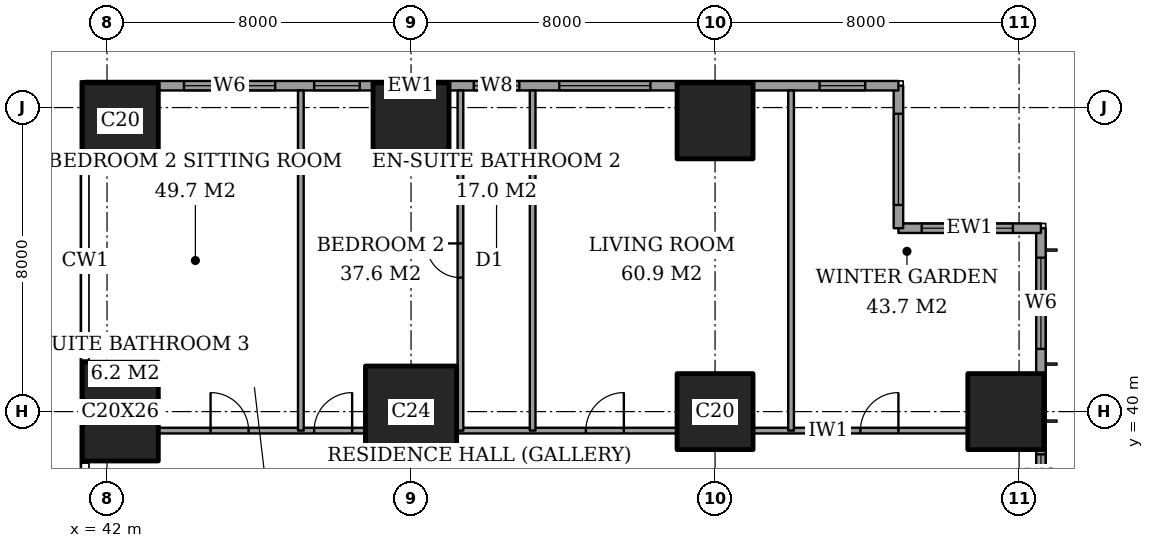
"""IFC4 building model, lengths in metres.
Left out: names, types, materials, properties, quantities, classifications, styles, units other than length and angle.
Written with IfcOpenShell. Run it as: python <this file> out.ifc"""

import sys

from ifc_helpers import new_model, si_unit, direction, frame, frame_2d, origin, origin_2d, place, context, subcontext, project, spatial, rectangle, extrude, element, fill, save


model = new_model("IFC4")
c1 = context("Model", 3, precision=1e-05, world=origin(), true_north=direction((0.0, 1.0)))
c2 = subcontext(c1, "Body", "Model", "MODEL_VIEW")
j1 = project(units=[si_unit("LENGTHUNIT", "METRE"), si_unit("PLANEANGLEUNIT", "RADIAN")], contexts=[c1])
p1 = place(None, origin())
s1 = spatial("IfcSite", under=j1, at=p1, CompositionType="ELEMENT")
p2 = place(p1, origin())
s2 = spatial("IfcBuilding", under=s1, at=p2, CompositionType="ELEMENT")
p3 = place(p2, frame((0.0, 0.0, 29.6)))
s3 = spatial("IfcBuildingStorey", under=s2, at=p3, CompositionType="ELEMENT", Elevation=29.6)
p4 = place(p3, frame((42.35, 40.0, 0.0), z_axis=(0.0, 0.0, 1.0), x_axis=(1.0, 0.0, 0.0)))
e1 = element("IfcColumn", 1, at=p4, inside=s3, PredefinedType="COLUMN", context=c2, shape_type="SweptSolid", body=[
    extrude(rectangle(XDim=2.0, YDim=2.6, at=origin_2d()), origin(), (0.0, 0.0, 1.0), 3.6),
])
p5 = place(p3, frame((42.35, 47.65, 0.0), z_axis=(0.0, 0.0, 1.0), x_axis=(1.0, 0.0, 0.0)))
e2 = element("IfcColumn", 2, at=p5, inside=s3, PredefinedType="COLUMN", context=c2, shape_type="SweptSolid", body=[
    extrude(rectangle(XDim=2.0, YDim=2.0, at=origin_2d()), origin(), (0.0, 0.0, 1.0), 3.6),
])
p6 = place(p3, frame((50.0, 40.0, 0.0), z_axis=(0.0, 0.0, 1.0), x_axis=(1.0, 0.0, 0.0)))
e3 = element("IfcColumn", 3, at=p6, inside=s3, PredefinedType="COLUMN", context=c2, shape_type="SweptSolid", body=[
    extrude(rectangle(XDim=2.4, YDim=2.4, at=origin_2d()), origin(), (0.0, 0.0, 1.0), 3.6),
])
for number, where, z_axis, x_axis in (
    (4, (50.0, 47.65, 0.0), (0.0, 0.0, 1.0), (1.0, 0.0, 0.0)),
    (5, (58.0, 40.0, 0.0), (0.0, 0.0, 1.0), (1.0, 0.0, 0.0)),
    (6, (58.0, 47.65, 0.0), (0.0, 0.0, 1.0), (1.0, 0.0, 0.0)),
    (7, (65.65, 40.0, 0.0), (0.0, 0.0, 1.0), (1.0, 0.0, 0.0)),
):
    element("IfcColumn", number, at=place(p3, frame(where, z_axis=z_axis, x_axis=x_axis)), inside=s3, PredefinedType="COLUMN", context=c2, shape_type="SweptSolid", body=[
        extrude(rectangle(XDim=2.0, YDim=2.0, at=origin_2d()), origin(), (0.0, 0.0, 1.0), 3.6),
    ])
p7 = place(p3, frame((66.575, 3.175, 0.0), z_axis=(0.0, 0.0, 1.0), x_axis=(0.0, 1.0, 0.0)))
e8 = element("IfcWall", 8, at=p7, inside=s3, PredefinedType="SOLIDWALL", context=c2, shape_type="SweptSolid", body=[
    extrude(rectangle(XDim=41.65, YDim=0.25, at=frame_2d((20.825, 0.0))), origin(), (0.0, 0.0, 1.0), 3.6),
])
p8 = place(p7, frame((0.775, 0.0, 0.6)))
e9 = element("IfcOpeningElement", 9, at=p8, cuts=e8, PredefinedType="OPENING", context=c2, shape_type="SweptSolid", body=[
    extrude(rectangle(XDim=2.4, YDim=2.0, at=frame_2d((1.2, 1.0))), frame((0.0, 0.135, 0.0), z_axis=(0.0, -1.0, 0.0), x_axis=(1.0, 0.0, 0.0)), (0.0, 0.0, 1.0), 0.27),
])
p9 = place(p7, frame((6.1, 0.0, 0.6)))
e10 = element("IfcOpeningElement", 10, at=p9, cuts=e8, PredefinedType="OPENING", context=c2, shape_type="SweptSolid", body=[
    extrude(rectangle(XDim=1.2, YDim=2.0, at=frame_2d((0.6, 1.0))), frame((0.0, 0.135, 0.0), z_axis=(0.0, -1.0, 0.0), x_axis=(1.0, 0.0, 0.0)), (0.0, 0.0, 1.0), 0.27),
])
p10 = place(p7, frame((8.275, 0.0, 0.6)))
e11 = element("IfcOpeningElement", 11, at=p10, cuts=e8, PredefinedType="OPENING", context=c2, shape_type="SweptSolid", body=[
    extrude(rectangle(XDim=2.4, YDim=2.0, at=frame_2d((1.2, 1.0))), frame((0.0, 0.135, 0.0), z_axis=(0.0, -1.0, 0.0), x_axis=(1.0, 0.0, 0.0)), (0.0, 0.0, 1.0), 0.27),
])
p11 = place(p7, frame((15.775, 0.0, 0.6)))
e12 = element("IfcOpeningElement", 12, at=p11, cuts=e8, PredefinedType="OPENING", context=c2, shape_type="SweptSolid", body=[
    extrude(rectangle(XDim=2.4, YDim=2.0, at=frame_2d((1.2, 1.0))), frame((0.0, 0.135, 0.0), z_axis=(0.0, -1.0, 0.0), x_axis=(1.0, 0.0, 0.0)), (0.0, 0.0, 1.0), 0.27),
])
p12 = place(p7, frame((23.475, 0.0, 0.6)))
e13 = element("IfcOpeningElement", 13, at=p12, cuts=e8, PredefinedType="OPENING", context=c2, shape_type="SweptSolid", body=[
    extrude(rectangle(XDim=2.4, YDim=2.0, at=frame_2d((1.2, 1.0))), frame((0.0, 0.135, 0.0), z_axis=(0.0, -1.0, 0.0), x_axis=(1.0, 0.0, 0.0)), (0.0, 0.0, 1.0), 0.27),
])
p13 = place(p7, frame((30.975, 0.0, 0.6)))
e14 = element("IfcOpeningElement", 14, at=p13, cuts=e8, PredefinedType="OPENING", context=c2, shape_type="SweptSolid", body=[
    extrude(rectangle(XDim=2.4, YDim=2.0, at=frame_2d((1.2, 1.0))), frame((0.0, 0.135, 0.0), z_axis=(0.0, -1.0, 0.0), x_axis=(1.0, 0.0, 0.0)), (0.0, 0.0, 1.0), 0.27),
])
p14 = place(p7, frame((34.5, 0.0, 0.6)))
e15 = element("IfcOpeningElement", 15, at=p14, cuts=e8, PredefinedType="OPENING", context=c2, shape_type="SweptSolid", body=[
    extrude(rectangle(XDim=1.2, YDim=2.0, at=frame_2d((0.6, 1.0))), frame((0.0, 0.135, 0.0), z_axis=(0.0, -1.0, 0.0), x_axis=(1.0, 0.0, 0.0)), (0.0, 0.0, 1.0), 0.27),
])
p15 = place(p7, frame((38.475, 0.0, 0.6)))
e16 = element("IfcOpeningElement", 16, at=p15, cuts=e8, PredefinedType="OPENING", context=c2, shape_type="SweptSolid", body=[
    extrude(rectangle(XDim=2.4, YDim=2.0, at=frame_2d((1.2, 1.0))), frame((0.0, 0.135, 0.0), z_axis=(0.0, -1.0, 0.0), x_axis=(1.0, 0.0, 0.0)), (0.0, 0.0, 1.0), 0.27),
])
p16 = place(p3, frame((66.575, 44.825, 0.0), z_axis=(0.0, 0.0, 1.0), x_axis=(-1.0, 0.0, 0.0)))
e17 = element("IfcWall", 17, at=p16, inside=s3, PredefinedType="SOLIDWALL", context=c2, shape_type="SweptSolid", body=[
    extrude(rectangle(XDim=3.75, YDim=0.25, at=frame_2d((1.875, 0.0))), origin(), (0.0, 0.0, 1.0), 3.6),
])
p17 = place(p16, frame((0.738, 0.0, 0.6)))
e18 = element("IfcOpeningElement", 18, at=p17, cuts=e17, PredefinedType="OPENING", context=c2, shape_type="SweptSolid", body=[
    extrude(rectangle(XDim=2.4, YDim=2.0, at=frame_2d((1.2, 1.0))), frame((0.0, 0.135, 0.0), z_axis=(0.0, -1.0, 0.0), x_axis=(1.0, 0.0, 0.0)), (0.0, 0.0, 1.0), 0.27),
])
p18 = place(p3, frame((62.825, 44.825, 0.0), z_axis=(0.0, 0.0, 1.0), x_axis=(0.0, 1.0, 0.0)))
e19 = element("IfcWall", 19, at=p18, inside=s3, PredefinedType="SOLIDWALL", context=c2, shape_type="SweptSolid", body=[
    extrude(rectangle(XDim=3.75, YDim=0.25, at=frame_2d((1.875, 0.0))), origin(), (0.0, 0.0, 1.0), 3.6),
])
p19 = place(p18, frame((0.613, 0.0, 0.6)))
e20 = element("IfcOpeningElement", 20, at=p19, cuts=e19, PredefinedType="OPENING", context=c2, shape_type="SweptSolid", body=[
    extrude(rectangle(XDim=2.4, YDim=2.0, at=frame_2d((1.2, 1.0))), frame((0.0, 0.135, 0.0), z_axis=(0.0, -1.0, 0.0), x_axis=(1.0, 0.0, 0.0)), (0.0, 0.0, 1.0), 0.27),
])
p20 = place(p3, frame((62.825, 48.575, 0.0), z_axis=(0.0, 0.0, 1.0), x_axis=(-1.0, 0.0, 0.0)))
e21 = element("IfcWall", 21, at=p20, inside=s3, PredefinedType="SOLIDWALL", context=c2, shape_type="SweptSolid", body=[
    extrude(rectangle(XDim=21.4, YDim=0.25, at=frame_2d((10.7, 0.0))), origin(), (0.0, 0.0, 1.0), 3.6),
])
p21 = place(p20, frame((0.875, 0.0, 0.6)))
e22 = element("IfcOpeningElement", 22, at=p21, cuts=e21, PredefinedType="OPENING", context=c2, shape_type="SweptSolid", body=[
    extrude(rectangle(XDim=1.2, YDim=2.0, at=frame_2d((0.6, 1.0))), frame((0.0, 0.135, 0.0), z_axis=(0.0, -1.0, 0.0), x_axis=(1.0, 0.0, 0.0)), (0.0, 0.0, 1.0), 0.27),
])
p22 = place(p20, frame((6.525, 0.0, 0.6)))
e23 = element("IfcOpeningElement", 23, at=p22, cuts=e21, PredefinedType="OPENING", context=c2, shape_type="SweptSolid", body=[
    extrude(rectangle(XDim=2.4, YDim=2.0, at=frame_2d((1.2, 1.0))), frame((0.0, 0.135, 0.0), z_axis=(0.0, -1.0, 0.0), x_axis=(1.0, 0.0, 0.0)), (0.0, 0.0, 1.0), 0.27),
])
p23 = place(p20, frame((9.975, 0.0, 0.6)))
e24 = element("IfcOpeningElement", 24, at=p23, cuts=e21, PredefinedType="OPENING", context=c2, shape_type="SweptSolid", body=[
    extrude(rectangle(XDim=1.2, YDim=2.0, at=frame_2d((0.6, 1.0))), frame((0.0, 0.135, 0.0), z_axis=(0.0, -1.0, 0.0), x_axis=(1.0, 0.0, 0.0)), (0.0, 0.0, 1.0), 0.27),
])
p24 = place(p20, frame((14.175, 0.0, 0.6)))
e25 = element("IfcOpeningElement", 25, at=p24, cuts=e21, PredefinedType="OPENING", context=c2, shape_type="SweptSolid", body=[
    extrude(rectangle(XDim=1.2, YDim=2.0, at=frame_2d((0.6, 1.0))), frame((0.0, 0.135, 0.0), z_axis=(0.0, -1.0, 0.0), x_axis=(1.0, 0.0, 0.0)), (0.0, 0.0, 1.0), 0.27),
])
p25 = place(p20, frame((16.4, 0.0, 0.6)))
e26 = element("IfcOpeningElement", 26, at=p25, cuts=e21, PredefinedType="OPENING", context=c2, shape_type="SweptSolid", body=[
    extrude(rectangle(XDim=2.4, YDim=2.0, at=frame_2d((1.2, 1.0))), frame((0.0, 0.135, 0.0), z_axis=(0.0, -1.0, 0.0), x_axis=(1.0, 0.0, 0.0)), (0.0, 0.0, 1.0), 0.27),
])
p26 = place(p3, frame((43.35, 39.5, 0.0), z_axis=(0.0, 0.0, 1.0), x_axis=(1.0, 0.0, 0.0)))
e27 = element("IfcWall", 27, at=p26, inside=s3, PredefinedType="PARTITIONING", context=c2, shape_type="SweptSolid", body=[
    extrude(rectangle(XDim=5.45, YDim=0.15, at=frame_2d((2.725, 0.0))), origin(), (0.0, 0.0, 1.0), 3.35),
])
p27 = place(p26, frame((4.1, 0.0, 0.0)))
e28 = element("IfcOpeningElement", 28, at=p27, cuts=e27, PredefinedType="OPENING", context=c2, shape_type="SweptSolid", body=[
    extrude(rectangle(XDim=1.0, YDim=2.1, at=frame_2d((0.5, 1.05))), frame((0.0, 0.085, 0.0), z_axis=(0.0, -1.0, 0.0), x_axis=(1.0, 0.0, 0.0)), (0.0, 0.0, 1.0), 0.17),
])
p28 = place(p26, frame((1.375, 0.0, 0.0)))
e29 = element("IfcOpeningElement", 29, at=p28, cuts=e27, PredefinedType="OPENING", context=c2, shape_type="SweptSolid", body=[
    extrude(rectangle(XDim=1.0, YDim=2.1, at=frame_2d((0.5, 1.05))), frame((0.0, 0.085, 0.0), z_axis=(0.0, -1.0, 0.0), x_axis=(1.0, 0.0, 0.0)), (0.0, 0.0, 1.0), 0.17),
])
p29 = place(p3, frame((51.2, 39.5, 0.0), z_axis=(0.0, 0.0, 1.0), x_axis=(1.0, 0.0, 0.0)))
e30 = element("IfcWall", 30, at=p29, inside=s3, PredefinedType="PARTITIONING", context=c2, shape_type="SweptSolid", body=[
    extrude(rectangle(XDim=5.8, YDim=0.15, at=frame_2d((2.9, 0.0))), origin(), (0.0, 0.0, 1.0), 3.35),
])
p30 = place(p29, frame((3.4, 0.0, 0.0)))
e31 = element("IfcOpeningElement", 31, at=p30, cuts=e30, PredefinedType="OPENING", context=c2, shape_type="SweptSolid", body=[
    extrude(rectangle(XDim=1.0, YDim=2.1, at=frame_2d((0.5, 1.05))), frame((0.0, 0.085, 0.0), z_axis=(0.0, -1.0, 0.0), x_axis=(1.0, 0.0, 0.0)), (0.0, 0.0, 1.0), 0.17),
])
p31 = place(p3, frame((59.0, 39.5, 0.0), z_axis=(0.0, 0.0, 1.0), x_axis=(1.0, 0.0, 0.0)))
e32 = element("IfcWall", 32, at=p31, inside=s3, PredefinedType="PARTITIONING", context=c2, shape_type="SweptSolid", body=[
    extrude(rectangle(XDim=5.65, YDim=0.15, at=frame_2d((2.825, 0.0))), origin(), (0.0, 0.0, 1.0), 3.35),
])
p32 = place(p31, frame((2.825, 0.0, 0.0)))
e33 = element("IfcOpeningElement", 33, at=p32, cuts=e32, PredefinedType="OPENING", context=c2, shape_type="SweptSolid", body=[
    extrude(rectangle(XDim=1.0, YDim=2.1, at=frame_2d((0.5, 1.05))), frame((0.0, 0.085, 0.0), z_axis=(0.0, -1.0, 0.0), x_axis=(1.0, 0.0, 0.0)), (0.0, 0.0, 1.0), 0.17),
])
p33 = place(p3, frame((47.1, 39.5, 0.0), z_axis=(0.0, 0.0, 1.0), x_axis=(0.0, 1.0, 0.0)))
e34 = element("IfcWall", 34, at=p33, inside=s3, PredefinedType="PARTITIONING", context=c2, shape_type="SweptSolid", body=[
    extrude(rectangle(XDim=8.95, YDim=0.15, at=frame_2d((4.475, 0.0))), origin(), (0.0, 0.0, 1.0), 3.35),
])
p34 = place(p3, frame((51.3, 39.5, 0.0), z_axis=(0.0, 0.0, 1.0), x_axis=(0.0, 1.0, 0.0)))
e35 = element("IfcWall", 35, at=p34, inside=s3, PredefinedType="PARTITIONING", context=c2, shape_type="SweptSolid", body=[
    extrude(rectangle(XDim=8.95, YDim=0.15, at=frame_2d((4.475, 0.0))), origin(), (0.0, 0.0, 1.0), 3.35),
])
p35 = place(p34, frame((4.025, 0.0, 0.0)))
e36 = element("IfcOpeningElement", 36, at=p35, cuts=e35, PredefinedType="OPENING", context=c2, shape_type="SweptSolid", body=[
    extrude(rectangle(XDim=0.9, YDim=2.1, at=frame_2d((0.45, 1.05))), frame((0.0, 0.085, 0.0), z_axis=(0.0, -1.0, 0.0), x_axis=(1.0, 0.0, 0.0)), (0.0, 0.0, 1.0), 0.17),
])
for number, where, z_axis, x_axis in (
    (37, (53.2, 39.5, 0.0), (0.0, 0.0, 1.0), (0.0, 1.0, 0.0)),
    (38, (60.0, 39.5, 0.0), (0.0, 0.0, 1.0), (0.0, 1.0, 0.0)),
):
    element("IfcWall", number, at=place(p3, frame(where, z_axis=z_axis, x_axis=x_axis)), inside=s3, PredefinedType="PARTITIONING", context=c2, shape_type="SweptSolid", body=[
        extrude(rectangle(XDim=8.95, YDim=0.15, at=frame_2d((4.475, 0.0))), origin(), (0.0, 0.0, 1.0), 3.35),
    ])
p36 = place(p14, origin())
e39 = element("IfcWindow", 39, at=p36, inside=s3, PartitioningType="SINGLE_PANEL", PredefinedType="WINDOW", context=c2, shape_type="SweptSolid", body=[
    extrude(rectangle(XDim=1.2, YDim=2.0, at=frame_2d((0.6, 1.0))), frame((0.0, 0.03, 0.0), z_axis=(0.0, -1.0, 0.0), x_axis=(1.0, 0.0, 0.0)), (0.0, 0.0, 1.0), 0.06),
])
fill(e15, e39)
p37 = place(p15, origin())
e40 = element("IfcWindow", 40, at=p37, inside=s3, PartitioningType="SINGLE_PANEL", PredefinedType="WINDOW", context=c2, shape_type="SweptSolid", body=[
    extrude(rectangle(XDim=2.4, YDim=2.0, at=frame_2d((1.2, 1.0))), frame((0.0, 0.03, 0.0), z_axis=(0.0, -1.0, 0.0), x_axis=(1.0, 0.0, 0.0)), (0.0, 0.0, 1.0), 0.06),
])
fill(e16, e40)
p38 = place(p17, origin())
e41 = element("IfcWindow", 41, at=p38, inside=s3, PartitioningType="SINGLE_PANEL", PredefinedType="WINDOW", context=c2, shape_type="SweptSolid", body=[
    extrude(rectangle(XDim=2.4, YDim=2.0, at=frame_2d((1.2, 1.0))), frame((0.0, 0.03, 0.0), z_axis=(0.0, -1.0, 0.0), x_axis=(1.0, 0.0, 0.0)), (0.0, 0.0, 1.0), 0.06),
])
fill(e18, e41)
p39 = place(p19, origin())
e42 = element("IfcWindow", 42, at=p39, inside=s3, PartitioningType="SINGLE_PANEL", PredefinedType="WINDOW", context=c2, shape_type="SweptSolid", body=[
    extrude(rectangle(XDim=2.4, YDim=2.0, at=frame_2d((1.2, 1.0))), frame((0.0, 0.03, 0.0), z_axis=(0.0, -1.0, 0.0), x_axis=(1.0, 0.0, 0.0)), (0.0, 0.0, 1.0), 0.06),
])
fill(e20, e42)
p40 = place(p21, origin())
e43 = element("IfcWindow", 43, at=p40, inside=s3, PartitioningType="SINGLE_PANEL", PredefinedType="WINDOW", context=c2, shape_type="SweptSolid", body=[
    extrude(rectangle(XDim=1.2, YDim=2.0, at=frame_2d((0.6, 1.0))), frame((0.0, 0.03, 0.0), z_axis=(0.0, -1.0, 0.0), x_axis=(1.0, 0.0, 0.0)), (0.0, 0.0, 1.0), 0.06),
])
fill(e22, e43)
p41 = place(p22, origin())
e44 = element("IfcWindow", 44, at=p41, inside=s3, PartitioningType="SINGLE_PANEL", PredefinedType="WINDOW", context=c2, shape_type="SweptSolid", body=[
    extrude(rectangle(XDim=2.4, YDim=2.0, at=frame_2d((1.2, 1.0))), frame((0.0, 0.03, 0.0), z_axis=(0.0, -1.0, 0.0), x_axis=(1.0, 0.0, 0.0)), (0.0, 0.0, 1.0), 0.06),
])
fill(e23, e44)
p42 = place(p23, origin())
e45 = element("IfcWindow", 45, at=p42, inside=s3, PartitioningType="SINGLE_PANEL", PredefinedType="WINDOW", context=c2, shape_type="SweptSolid", body=[
    extrude(rectangle(XDim=1.2, YDim=2.0, at=frame_2d((0.6, 1.0))), frame((0.0, 0.03, 0.0), z_axis=(0.0, -1.0, 0.0), x_axis=(1.0, 0.0, 0.0)), (0.0, 0.0, 1.0), 0.06),
])
fill(e24, e45)
p43 = place(p24, origin())
e46 = element("IfcWindow", 46, at=p43, inside=s3, PartitioningType="SINGLE_PANEL", PredefinedType="WINDOW", context=c2, shape_type="SweptSolid", body=[
    extrude(rectangle(XDim=1.2, YDim=2.0, at=frame_2d((0.6, 1.0))), frame((0.0, 0.03, 0.0), z_axis=(0.0, -1.0, 0.0), x_axis=(1.0, 0.0, 0.0)), (0.0, 0.0, 1.0), 0.06),
])
fill(e25, e46)
p44 = place(p25, origin())
e47 = element("IfcWindow", 47, at=p44, inside=s3, PartitioningType="SINGLE_PANEL", PredefinedType="WINDOW", context=c2, shape_type="SweptSolid", body=[
    extrude(rectangle(XDim=2.4, YDim=2.0, at=frame_2d((1.2, 1.0))), frame((0.0, 0.03, 0.0), z_axis=(0.0, -1.0, 0.0), x_axis=(1.0, 0.0, 0.0)), (0.0, 0.0, 1.0), 0.06),
])
fill(e26, e47)
p45 = place(p32, origin())
e48 = element("IfcDoor", 48, at=p45, inside=s3, OperationType="SINGLE_SWING_LEFT", PredefinedType="DOOR", context=c2, shape_type="SweptSolid", body=[
    extrude(rectangle(XDim=1.0, YDim=2.1, at=frame_2d((0.5, 1.05))), frame((0.0, 0.025, 0.0), z_axis=(0.0, -1.0, 0.0), x_axis=(1.0, 0.0, 0.0)), (0.0, 0.0, 1.0), 0.05),
])
fill(e33, e48)
p46 = place(p30, origin())
e49 = element("IfcDoor", 49, at=p46, inside=s3, OperationType="SINGLE_SWING_LEFT", PredefinedType="DOOR", context=c2, shape_type="SweptSolid", body=[
    extrude(rectangle(XDim=1.0, YDim=2.1, at=frame_2d((0.5, 1.05))), frame((0.0, 0.025, 0.0), z_axis=(0.0, -1.0, 0.0), x_axis=(1.0, 0.0, 0.0)), (0.0, 0.0, 1.0), 0.05),
])
fill(e31, e49)
p47 = place(p35, origin())
e50 = element("IfcDoor", 50, at=p47, inside=s3, OperationType="SINGLE_SWING_LEFT", PredefinedType="DOOR", context=c2, shape_type="SweptSolid", body=[
    extrude(rectangle(XDim=0.9, YDim=2.1, at=frame_2d((0.45, 1.05))), frame((0.0, 0.025, 0.0), z_axis=(0.0, -1.0, 0.0), x_axis=(1.0, 0.0, 0.0)), (0.0, 0.0, 1.0), 0.05),
])
fill(e36, e50)
p48 = place(p27, origin())
e51 = element("IfcDoor", 51, at=p48, inside=s3, OperationType="SINGLE_SWING_LEFT", PredefinedType="DOOR", context=c2, shape_type="SweptSolid", body=[
    extrude(rectangle(XDim=1.0, YDim=2.1, at=frame_2d((0.5, 1.05))), frame((0.0, 0.025, 0.0), z_axis=(0.0, -1.0, 0.0), x_axis=(1.0, 0.0, 0.0)), (0.0, 0.0, 1.0), 0.05),
])
fill(e28, e51)
p49 = place(p28, origin())
e52 = element("IfcDoor", 52, at=p49, inside=s3, OperationType="SINGLE_SWING_RIGHT", PredefinedType="DOOR", context=c2, shape_type="SweptSolid", body=[
    extrude(rectangle(XDim=1.0, YDim=2.1, at=frame_2d((0.5, 1.05))), frame((0.0, 0.025, 0.0), z_axis=(0.0, -1.0, 0.0), x_axis=(1.0, 0.0, 0.0)), (0.0, 0.0, 1.0), 0.05),
])
fill(e29, e52)
save(model, sys.argv[1])
